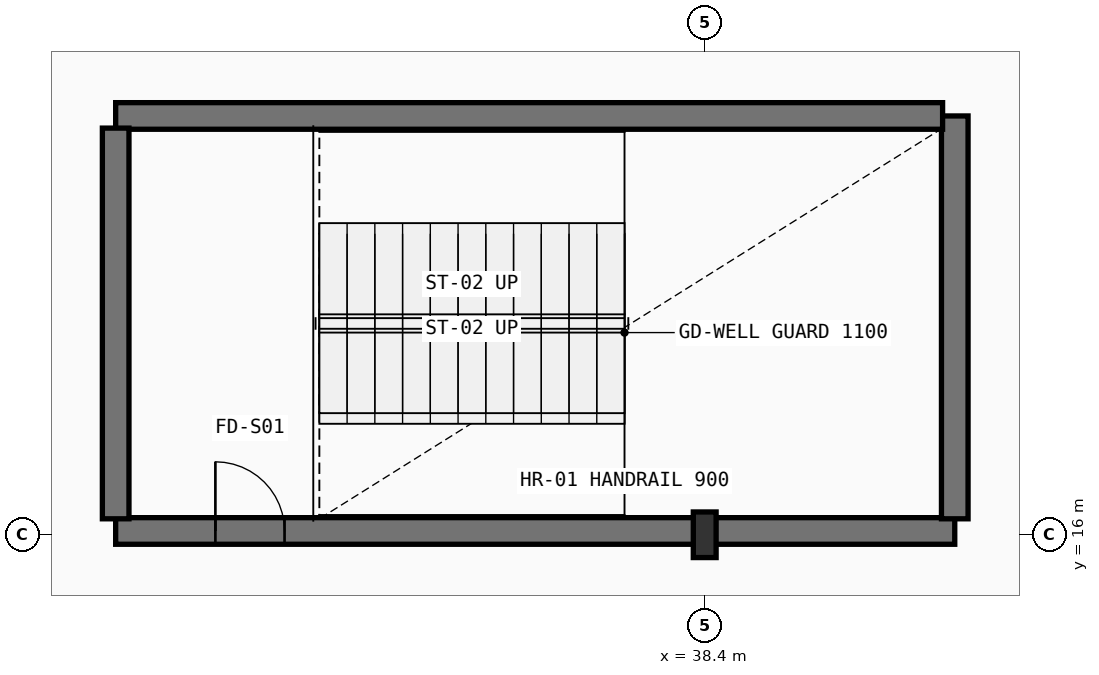
"""IFC4 building model, lengths in metres.
Left out: names, types, materials, properties, quantities, classifications, styles, units other than length and angle.
Written with IfcOpenShell. Run it as: python <this file> out.ifc"""

import sys

from ifc_helpers import new_model, si_unit, direction, frame, frame_2d, origin, origin_2d, place, context, subcontext, project, spatial, rectangle, i_section, extrude, element, fill, save


model = new_model("IFC4")
c1 = context("Model", 3, precision=1e-05, world=origin(), true_north=direction((0.0, 1.0)))
c2 = subcontext(c1, "Body", "Model", "MODEL_VIEW")
j1 = project(units=[si_unit("LENGTHUNIT", "METRE"), si_unit("PLANEANGLEUNIT", "RADIAN")], contexts=[c1])
p1 = place(None, origin())
s1 = spatial("IfcSite", under=j1, at=p1, CompositionType="ELEMENT")
p2 = place(p1, origin())
s2 = spatial("IfcBuilding", under=s1, at=p2, CompositionType="ELEMENT")
p3 = place(p2, frame((0.0, 0.0, 11.4)))
s3 = spatial("IfcBuildingStorey", under=s2, at=p3, CompositionType="ELEMENT", Elevation=11.4)
p4 = place(p3, frame((38.4, 16.0, 0.0), z_axis=(0.0, 0.0, 1.0), x_axis=(1.0, 0.0, 0.0)))
e1 = element("IfcColumn", 1, at=p4, inside=s3, PredefinedType="COLUMN", context=c2, shape_type="SweptSolid", body=[
    extrude(i_section(OverallWidth=0.3, OverallDepth=0.6, WebThickness=0.015, FlangeThickness=0.03, FilletRadius=0.027, at=origin_2d()), origin(), (0.0, 0.0, 1.0), 4.5),
])
p5 = place(p3, frame((30.65, 16.05, 0.0), z_axis=(0.0, 0.0, 1.0), x_axis=(1.0, 0.0, 0.0)))
e2 = element("IfcWall", 2, at=p5, inside=s3, PredefinedType="SHEAR", context=c2, shape_type="SweptSolid", body=[
    extrude(rectangle(XDim=11.04, YDim=0.35, at=frame_2d((5.52, 0.0))), origin(), (0.0, 0.0, 1.0), 4.27),
])
p6 = place(p5, frame((1.312, 0.0, 0.0)))
e3 = element("IfcOpeningElement", 3, at=p6, cuts=e2, PredefinedType="OPENING", context=c2, shape_type="SweptSolid", body=[
    extrude(rectangle(XDim=0.91, YDim=2.08, at=frame_2d((0.455, 1.04))), frame((0.0, 0.185, 0.0), z_axis=(0.0, -1.0, 0.0), x_axis=(1.0, 0.0, 0.0)), (0.0, 0.0, 1.0), 0.37),
])
p7 = place(p3, frame((41.69, 16.21, 0.0), z_axis=(0.0, 0.0, 1.0), x_axis=(0.0, 1.0, 0.0)))
e4 = element("IfcWall", 4, at=p7, inside=s3, PredefinedType="SHEAR", context=c2, shape_type="SweptSolid", body=[
    extrude(rectangle(XDim=5.3, YDim=0.35, at=frame_2d((2.65, 0.0))), origin(), (0.0, 0.0, 1.0), 4.27),
])
p8 = place(p3, frame((41.53, 21.51, 0.0), z_axis=(0.0, 0.0, 1.0), x_axis=(-1.0, 0.0, 0.0)))
e5 = element("IfcWall", 5, at=p8, inside=s3, PredefinedType="SHEAR", context=c2, shape_type="SweptSolid", body=[
    extrude(rectangle(XDim=10.88, YDim=0.35, at=frame_2d((5.44, 0.0))), origin(), (0.0, 0.0, 1.0), 4.27),
])
p9 = place(p3, frame((30.65, 21.35, 0.0), z_axis=(0.0, 0.0, 1.0), x_axis=(0.0, -1.0, 0.0)))
e6 = element("IfcWall", 6, at=p9, inside=s3, PredefinedType="SHEAR", context=c2, shape_type="SweptSolid", body=[
    extrude(rectangle(XDim=5.14, YDim=0.35, at=frame_2d((2.57, 0.0))), origin(), (0.0, 0.0, 1.0), 4.27),
])
p10 = place(p6, origin())
e7 = element("IfcDoor", 7, at=p10, inside=s3, OperationType="SINGLE_SWING_LEFT", PredefinedType="DOOR", context=c2, shape_type="SweptSolid", body=[
    extrude(rectangle(XDim=0.91, YDim=2.08, at=frame_2d((0.455, 1.04))), frame((0.0, 0.025, 0.0), z_axis=(0.0, -1.0, 0.0), x_axis=(1.0, 0.0, 0.0)), (0.0, 0.0, 1.0), 0.05),
])
fill(e3, e7)
save(model, sys.argv[1])
